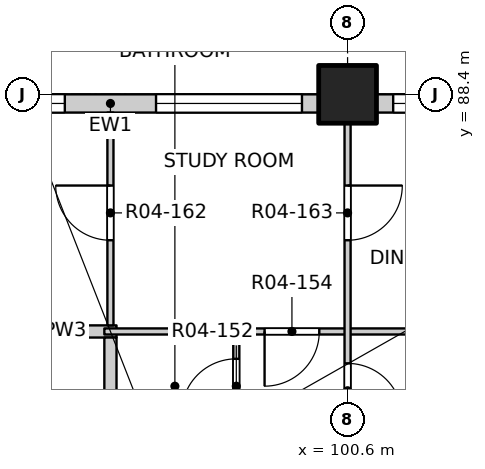
"""IFC4 building model, lengths in metres.
Left out: names, types, materials, properties, quantities, classifications, styles, units other than length and angle.
Written with IfcOpenShell. Run it as: python <this file> out.ifc"""

import sys

from ifc_helpers import new_model, si_unit, direction, frame, frame_2d, origin, origin_2d, place, context, subcontext, project, spatial, rectangle, extrude, element, fill, save


model = new_model("IFC4")
c1 = context("Model", 3, precision=1e-05, world=origin(), true_north=direction((0.0, 1.0)))
c2 = subcontext(c1, "Body", "Model", "MODEL_VIEW")
j1 = project(units=[si_unit("LENGTHUNIT", "METRE"), si_unit("PLANEANGLEUNIT", "RADIAN")], contexts=[c1])
p1 = place(None, origin())
s1 = spatial("IfcSite", under=j1, at=p1, CompositionType="ELEMENT")
p2 = place(p1, origin())
s2 = spatial("IfcBuilding", under=s1, at=p2, CompositionType="ELEMENT")
p3 = place(p2, frame((0.0, 0.0, 58.0)))
s3 = spatial("IfcBuildingStorey", under=s2, at=p3, CompositionType="ELEMENT", Elevation=58.0)
p4 = place(p3, frame((100.6, 88.4, -0.25), z_axis=(0.0, 0.0, 1.0), x_axis=(1.0, 0.0, 0.0)))
e1 = element("IfcColumn", 1, at=p4, inside=s3, PredefinedType="COLUMN", context=c2, shape_type="SweptSolid", body=[
    extrude(rectangle(XDim=0.95, YDim=0.95, at=origin_2d()), origin(), (0.0, 0.0, 1.0), 3.4),
])
p5 = place(p3, frame((93.275, 88.25, 0.0), z_axis=(0.0, 0.0, 1.0), x_axis=(1.0, 0.0, 0.0)))
e2 = element("IfcWall", 2, at=p5, inside=s3, PredefinedType="SOLIDWALL", context=c2, shape_type="SweptSolid", body=[
    extrude(rectangle(XDim=6.85, YDim=0.3, at=frame_2d((3.425, 0.0))), origin(), (0.0, 0.0, 1.0), 2.7),
])
p6 = place(p5, frame((0.275, 0.0, 0.9)))
e3 = element("IfcOpeningElement", 3, at=p6, cuts=e2, PredefinedType="OPENING", context=c2, shape_type="SweptSolid", body=[
    extrude(rectangle(XDim=2.4, YDim=1.8, at=frame_2d((1.2, 0.9))), frame((0.0, 0.16, 0.0), z_axis=(0.0, -1.0, 0.0), x_axis=(1.0, 0.0, 0.0)), (0.0, 0.0, 1.0), 0.32),
])
p7 = place(p5, frame((4.175, 0.0, 0.9)))
e4 = element("IfcOpeningElement", 4, at=p7, cuts=e2, PredefinedType="OPENING", context=c2, shape_type="SweptSolid", body=[
    extrude(rectangle(XDim=2.4, YDim=1.8, at=frame_2d((1.2, 0.9))), frame((0.0, 0.16, 0.0), z_axis=(0.0, -1.0, 0.0), x_axis=(1.0, 0.0, 0.0)), (0.0, 0.0, 1.0), 0.32),
])
p8 = place(p3, frame((101.075, 88.25, 0.0), z_axis=(0.0, 0.0, 1.0), x_axis=(1.0, 0.0, 0.0)))
e5 = element("IfcWall", 5, at=p8, inside=s3, PredefinedType="SOLIDWALL", context=c2, shape_type="SweptSolid", body=[
    extrude(rectangle(XDim=3.425, YDim=0.3, at=frame_2d((1.712, 0.0))), origin(), (0.0, 0.0, 1.0), 2.7),
])
p9 = place(p8, frame((0.275, 0.0, 0.9)))
e6 = element("IfcOpeningElement", 6, at=p9, cuts=e5, PredefinedType="OPENING", context=c2, shape_type="SweptSolid", body=[
    extrude(rectangle(XDim=2.4, YDim=1.8, at=frame_2d((1.2, 0.9))), frame((0.0, 0.16, 0.0), z_axis=(0.0, -1.0, 0.0), x_axis=(1.0, 0.0, 0.0)), (0.0, 0.0, 1.0), 0.32),
])
p10 = place(p3, frame((95.1, 84.5, 0.0), z_axis=(0.0, 0.0, 1.0), x_axis=(1.0, 0.0, 0.0)))
e7 = element("IfcWall", 7, at=p10, inside=s3, PredefinedType="PARTITIONING", context=c2, shape_type="SweptSolid", body=[
    extrude(rectangle(XDim=1.7, YDim=0.2, at=frame_2d((0.85, 0.0))), origin(), (0.0, 0.0, 1.0), 3.15),
])
p11 = place(p3, frame((96.6, 84.5, 0.0), z_axis=(0.0, 0.0, 1.0), x_axis=(1.0, 0.0, 0.0)))
e8 = element("IfcWall", 8, at=p11, inside=s3, PredefinedType="PARTITIONING", context=c2, shape_type="SweptSolid", body=[
    extrude(rectangle(XDim=11.5, YDim=0.1, at=frame_2d((5.75, 0.0))), origin(), (0.0, 0.0, 1.0), 3.15),
])
p12 = place(p11, frame((2.635, 0.0, 0.0)))
e9 = element("IfcOpeningElement", 9, at=p12, cuts=e8, PredefinedType="OPENING", context=c2, shape_type="SweptSolid", body=[
    extrude(rectangle(XDim=0.9, YDim=2.1, at=frame_2d((0.45, 1.05))), frame((0.0, 0.06, 0.0), z_axis=(0.0, -1.0, 0.0), x_axis=(1.0, 0.0, 0.0)), (0.0, 0.0, 1.0), 0.12),
])
p13 = place(p3, frame((96.7, 53.4, 0.0), z_axis=(0.0, 0.0, 1.0), x_axis=(0.0, 1.0, 0.0)))
e10 = element("IfcWall", 10, at=p13, inside=s3, PredefinedType="PARTITIONING", context=c2, shape_type="SweptSolid", body=[
    extrude(rectangle(XDim=31.0, YDim=0.2, at=frame_2d((15.5, 0.0))), origin(), (0.0, 0.0, 1.0), 3.15),
])
p14 = place(p13, frame((3.525, 0.0, 0.0)))
e11 = element("IfcOpeningElement", 11, at=p14, cuts=e10, PredefinedType="OPENING", context=c2, shape_type="SweptSolid", body=[
    extrude(rectangle(XDim=1.0, YDim=2.1, at=frame_2d((0.5, 1.05))), frame((0.0, 0.11, 0.0), z_axis=(0.0, -1.0, 0.0), x_axis=(1.0, 0.0, 0.0)), (0.0, 0.0, 1.0), 0.22),
])
p15 = place(p13, frame((10.825, 0.0, 0.0)))
e12 = element("IfcOpeningElement", 12, at=p15, cuts=e10, PredefinedType="OPENING", context=c2, shape_type="SweptSolid", body=[
    extrude(rectangle(XDim=1.0, YDim=2.1, at=frame_2d((0.5, 1.05))), frame((0.0, 0.11, 0.0), z_axis=(0.0, -1.0, 0.0), x_axis=(1.0, 0.0, 0.0)), (0.0, 0.0, 1.0), 0.22),
])
p16 = place(p13, frame((25.975, 0.0, 0.0)))
e13 = element("IfcOpeningElement", 13, at=p16, cuts=e10, PredefinedType="OPENING", context=c2, shape_type="SweptSolid", body=[
    extrude(rectangle(XDim=1.0, YDim=2.1, at=frame_2d((0.5, 1.05))), frame((0.0, 0.11, 0.0), z_axis=(0.0, -1.0, 0.0), x_axis=(1.0, 0.0, 0.0)), (0.0, 0.0, 1.0), 0.22),
])
p17 = place(p3, frame((96.7, 84.6, 0.0), z_axis=(0.0, 0.0, 1.0), x_axis=(0.0, 1.0, 0.0)))
e14 = element("IfcWall", 14, at=p17, inside=s3, PredefinedType="PARTITIONING", context=c2, shape_type="SweptSolid", body=[
    extrude(rectangle(XDim=3.5, YDim=0.1, at=frame_2d((1.75, 0.0))), origin(), (0.0, 0.0, 1.0), 3.15),
])
p18 = place(p17, frame((1.4, 0.0, 0.0)))
e15 = element("IfcOpeningElement", 15, at=p18, cuts=e14, PredefinedType="OPENING", context=c2, shape_type="SweptSolid", body=[
    extrude(rectangle(XDim=0.9, YDim=2.1, at=frame_2d((0.45, 1.05))), frame((0.0, 0.06, 0.0), z_axis=(0.0, -1.0, 0.0), x_axis=(1.0, 0.0, 0.0)), (0.0, 0.0, 1.0), 0.12),
])
p19 = place(p3, frame((98.77, 79.25, 0.0), z_axis=(0.0, 0.0, 1.0), x_axis=(0.0, 1.0, 0.0)))
e16 = element("IfcWall", 16, at=p19, inside=s3, PredefinedType="PARTITIONING", context=c2, shape_type="SweptSolid", body=[
    extrude(rectangle(XDim=5.2, YDim=0.1, at=frame_2d((2.6, 0.0))), origin(), (0.0, 0.0, 1.0), 3.15),
])
p20 = place(p19, frame((0.4, 0.0, 0.0)))
e17 = element("IfcOpeningElement", 17, at=p20, cuts=e16, PredefinedType="OPENING", context=c2, shape_type="SweptSolid", body=[
    extrude(rectangle(XDim=0.8, YDim=2.1, at=frame_2d((0.4, 1.05))), frame((0.0, 0.06, 0.0), z_axis=(0.0, -1.0, 0.0), x_axis=(1.0, 0.0, 0.0)), (0.0, 0.0, 1.0), 0.12),
])
p21 = place(p19, frame((2.1, 0.0, 0.0)))
e18 = element("IfcOpeningElement", 18, at=p21, cuts=e16, PredefinedType="OPENING", context=c2, shape_type="SweptSolid", body=[
    extrude(rectangle(XDim=0.9, YDim=2.1, at=frame_2d((0.45, 1.05))), frame((0.0, 0.06, 0.0), z_axis=(0.0, -1.0, 0.0), x_axis=(1.0, 0.0, 0.0)), (0.0, 0.0, 1.0), 0.12),
])
p22 = place(p19, frame((3.9, 0.0, 0.0)))
e19 = element("IfcOpeningElement", 19, at=p22, cuts=e16, PredefinedType="OPENING", context=c2, shape_type="SweptSolid", body=[
    extrude(rectangle(XDim=0.9, YDim=2.1, at=frame_2d((0.45, 1.05))), frame((0.0, 0.06, 0.0), z_axis=(0.0, -1.0, 0.0), x_axis=(1.0, 0.0, 0.0)), (0.0, 0.0, 1.0), 0.12),
])
p23 = place(p3, frame((100.6, 80.6, 0.0), z_axis=(0.0, 0.0, 1.0), x_axis=(0.0, 1.0, 0.0)))
e20 = element("IfcWall", 20, at=p23, inside=s3, PredefinedType="PARTITIONING", context=c2, shape_type="SweptSolid", body=[
    extrude(rectangle(XDim=7.5, YDim=0.1, at=frame_2d((3.75, 0.0))), origin(), (0.0, 0.0, 1.0), 2.55),
])
p24 = place(p23, frame((2.475, 0.0, 0.0)))
e21 = element("IfcOpeningElement", 21, at=p24, cuts=e20, PredefinedType="OPENING", context=c2, shape_type="SweptSolid", body=[
    extrude(rectangle(XDim=0.9, YDim=2.1, at=frame_2d((0.45, 1.05))), frame((0.0, 0.06, 0.0), z_axis=(0.0, -1.0, 0.0), x_axis=(1.0, 0.0, 0.0)), (0.0, 0.0, 1.0), 0.12),
])
p25 = place(p23, frame((5.4, 0.0, 0.0)))
e22 = element("IfcOpeningElement", 22, at=p25, cuts=e20, PredefinedType="OPENING", context=c2, shape_type="SweptSolid", body=[
    extrude(rectangle(XDim=0.9, YDim=2.1, at=frame_2d((0.45, 1.05))), frame((0.0, 0.06, 0.0), z_axis=(0.0, -1.0, 0.0), x_axis=(1.0, 0.0, 0.0)), (0.0, 0.0, 1.0), 0.12),
])
p26 = place(p6, origin())
e23 = element("IfcWindow", 23, at=p26, inside=s3, PartitioningType="DOUBLE_PANEL_VERTICAL", PredefinedType="WINDOW", context=c2, shape_type="SweptSolid", body=[
    extrude(rectangle(XDim=2.4, YDim=1.8, at=frame_2d((1.2, 0.9))), frame((0.0, 0.03, 0.0), z_axis=(0.0, -1.0, 0.0), x_axis=(1.0, 0.0, 0.0)), (0.0, 0.0, 1.0), 0.06),
])
fill(e3, e23)
p27 = place(p7, origin())
e24 = element("IfcWindow", 24, at=p27, inside=s3, PartitioningType="DOUBLE_PANEL_VERTICAL", PredefinedType="WINDOW", context=c2, shape_type="SweptSolid", body=[
    extrude(rectangle(XDim=2.4, YDim=1.8, at=frame_2d((1.2, 0.9))), frame((0.0, 0.03, 0.0), z_axis=(0.0, -1.0, 0.0), x_axis=(1.0, 0.0, 0.0)), (0.0, 0.0, 1.0), 0.06),
])
fill(e4, e24)
p28 = place(p9, origin())
e25 = element("IfcWindow", 25, at=p28, inside=s3, PartitioningType="DOUBLE_PANEL_VERTICAL", PredefinedType="WINDOW", context=c2, shape_type="SweptSolid", body=[
    extrude(rectangle(XDim=2.4, YDim=1.8, at=frame_2d((1.2, 0.9))), frame((0.0, 0.03, 0.0), z_axis=(0.0, -1.0, 0.0), x_axis=(1.0, 0.0, 0.0)), (0.0, 0.0, 1.0), 0.06),
])
fill(e6, e25)
p29 = place(p24, origin())
e26 = element("IfcDoor", 26, at=p29, inside=s3, OperationType="SINGLE_SWING_RIGHT", PredefinedType="DOOR", context=c2, shape_type="SweptSolid", body=[
    extrude(rectangle(XDim=0.9, YDim=2.1, at=frame_2d((0.45, 1.05))), frame((0.0, 0.025, 0.0), z_axis=(0.0, -1.0, 0.0), x_axis=(1.0, 0.0, 0.0)), (0.0, 0.0, 1.0), 0.05),
])
fill(e21, e26)
p30 = place(p22, origin())
e27 = element("IfcDoor", 27, at=p30, inside=s3, OperationType="SINGLE_SWING_LEFT", PredefinedType="DOOR", context=c2, shape_type="SweptSolid", body=[
    extrude(rectangle(XDim=0.9, YDim=2.1, at=frame_2d((0.45, 1.05))), frame((0.0, 0.025, 0.0), z_axis=(0.0, -1.0, 0.0), x_axis=(1.0, 0.0, 0.0)), (0.0, 0.0, 1.0), 0.05),
])
fill(e19, e27)
p31 = place(p12, origin())
e28 = element("IfcDoor", 28, at=p31, inside=s3, OperationType="SINGLE_SWING_RIGHT", PredefinedType="DOOR", context=c2, shape_type="SweptSolid", body=[
    extrude(rectangle(XDim=0.9, YDim=2.1, at=frame_2d((0.45, 1.05))), frame((0.0, 0.025, 0.0), z_axis=(0.0, -1.0, 0.0), x_axis=(1.0, 0.0, 0.0)), (0.0, 0.0, 1.0), 0.05),
])
fill(e9, e28)
p32 = place(p18, origin())
e29 = element("IfcDoor", 29, at=p32, inside=s3, OperationType="SINGLE_SWING_RIGHT", PredefinedType="DOOR", context=c2, shape_type="SweptSolid", body=[
    extrude(rectangle(XDim=0.9, YDim=2.1, at=frame_2d((0.45, 1.05))), frame((0.0, 0.025, 0.0), z_axis=(0.0, -1.0, 0.0), x_axis=(1.0, 0.0, 0.0)), (0.0, 0.0, 1.0), 0.05),
])
fill(e15, e29)
p33 = place(p25, origin())
e30 = element("IfcDoor", 30, at=p33, inside=s3, OperationType="SINGLE_SWING_LEFT", PredefinedType="DOOR", context=c2, shape_type="SweptSolid", body=[
    extrude(rectangle(XDim=0.9, YDim=2.1, at=frame_2d((0.45, 1.05))), frame((0.0, 0.025, 0.0), z_axis=(0.0, -1.0, 0.0), x_axis=(1.0, 0.0, 0.0)), (0.0, 0.0, 1.0), 0.05),
])
fill(e22, e30)
save(model, sys.argv[1])
